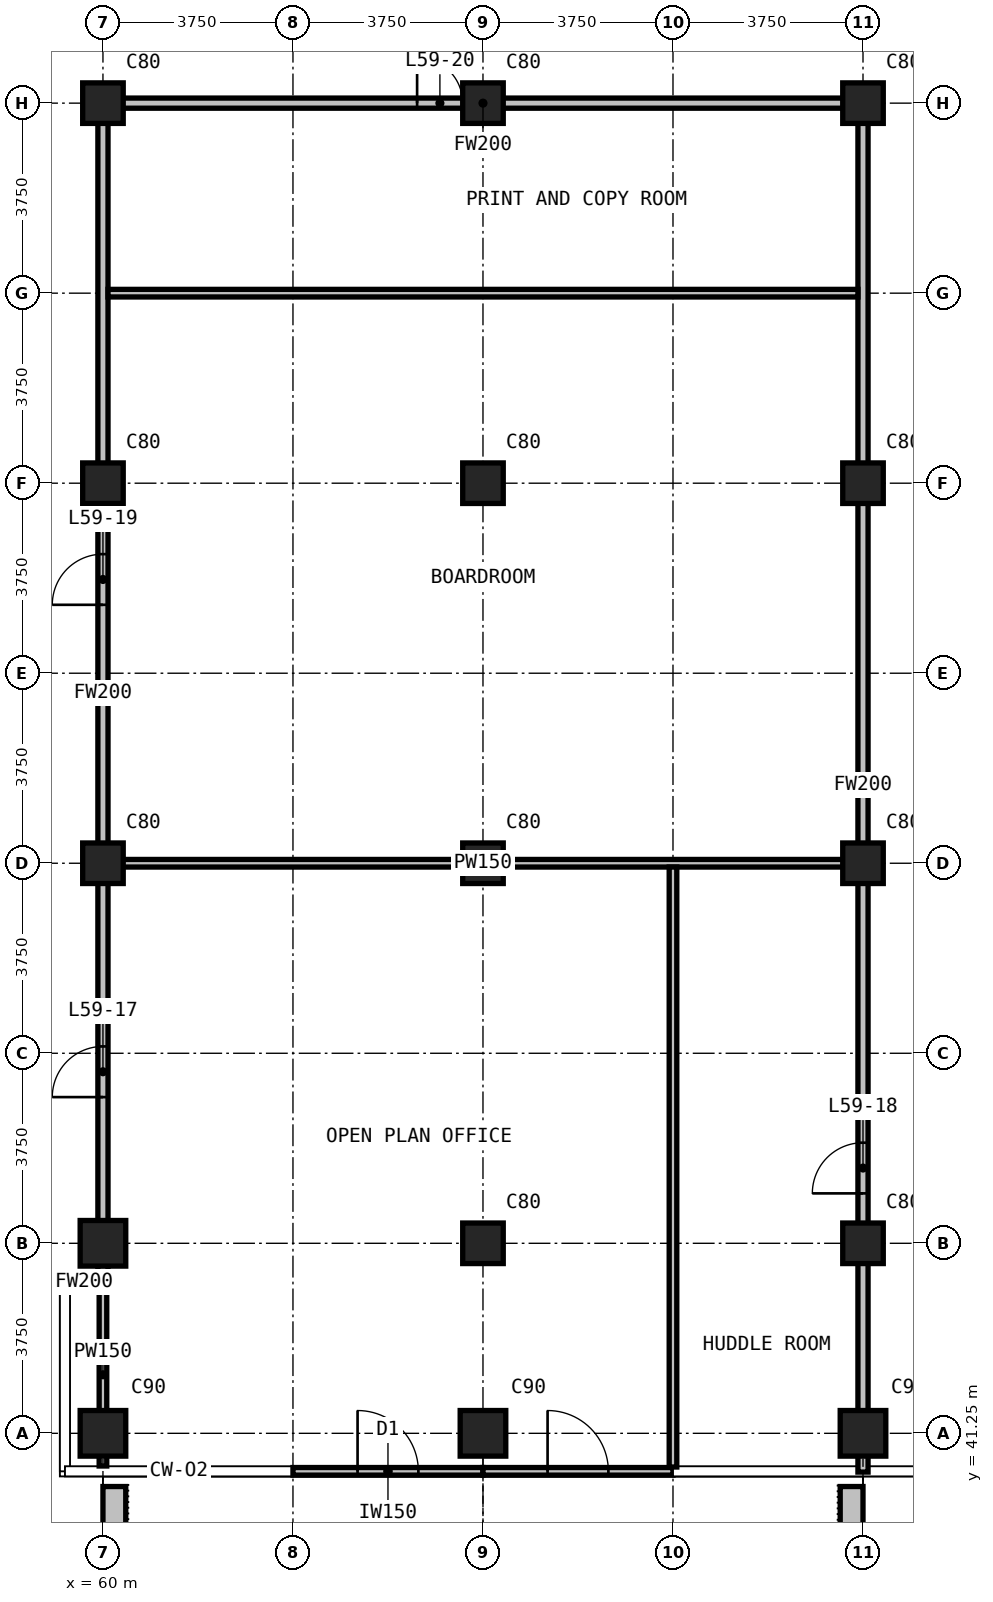
"""IFC4 building model, lengths in metres.
Left out: names, types, materials, properties, quantities, classifications, styles, units other than length and angle.
Written with IfcOpenShell. Run it as: python <this file> out.ifc"""

import sys

from ifc_helpers import new_model, si_unit, direction, frame, frame_2d, origin, origin_2d, place, context, subcontext, project, spatial, rectangle, extrude, element, fill, save


model = new_model("IFC4")
c1 = context("Model", 3, precision=1e-05, world=origin(), true_north=direction((0.0, 1.0)))
c2 = subcontext(c1, "Body", "Model", "MODEL_VIEW")
j1 = project(units=[si_unit("LENGTHUNIT", "METRE"), si_unit("PLANEANGLEUNIT", "RADIAN")], contexts=[c1])
p1 = place(None, origin())
s1 = spatial("IfcSite", under=j1, at=p1, CompositionType="ELEMENT")
p2 = place(p1, origin())
s2 = spatial("IfcBuilding", under=s1, at=p2, CompositionType="ELEMENT")
p3 = place(p2, frame((0.0, 0.0, 228.3)))
s3 = spatial("IfcBuildingStorey", under=s2, at=p3, CompositionType="ELEMENT", Elevation=228.3)
for number, where, z_axis, x_axis in (
    (1, (60.0, 41.25, 0.0), (0.0, 0.0, 1.0), (1.0, 0.0, 0.0)),
    (2, (60.0, 45.0, 0.0), (0.0, 0.0, 1.0), (1.0, 0.0, 0.0)),
):
    element("IfcColumn", number, at=place(p3, frame(where, z_axis=z_axis, x_axis=x_axis)), inside=s3, PredefinedType="COLUMN", context=c2, shape_type="SweptSolid", body=[
        extrude(rectangle(XDim=0.9, YDim=0.9, at=origin_2d()), origin(), (0.0, 0.0, 1.0), 3.6),
    ])
for number, where, z_axis, x_axis in (
    (3, (60.0, 52.5, 0.0), (0.0, 0.0, 1.0), (1.0, 0.0, 0.0)),
    (4, (60.0, 60.0, 0.0), (0.0, 0.0, 1.0), (1.0, 0.0, 0.0)),
    (5, (60.0, 67.5, 0.0), (0.0, 0.0, 1.0), (1.0, 0.0, 0.0)),
):
    element("IfcColumn", number, at=place(p3, frame(where, z_axis=z_axis, x_axis=x_axis)), inside=s3, PredefinedType="COLUMN", context=c2, shape_type="SweptSolid", body=[
        extrude(rectangle(XDim=0.8, YDim=0.8, at=origin_2d()), origin(), (0.0, 0.0, 1.0), 3.6),
    ])
p4 = place(p3, frame((67.5, 41.25, 0.0), z_axis=(0.0, 0.0, 1.0), x_axis=(1.0, 0.0, 0.0)))
e6 = element("IfcColumn", 6, at=p4, inside=s3, PredefinedType="COLUMN", context=c2, shape_type="SweptSolid", body=[
    extrude(rectangle(XDim=0.9, YDim=0.9, at=origin_2d()), origin(), (0.0, 0.0, 1.0), 3.6),
])
for number, where, z_axis, x_axis in (
    (7, (67.5, 45.0, 0.0), (0.0, 0.0, 1.0), (1.0, 0.0, 0.0)),
    (8, (67.5, 52.5, 0.0), (0.0, 0.0, 1.0), (1.0, 0.0, 0.0)),
    (9, (67.5, 60.0, 0.0), (0.0, 0.0, 1.0), (1.0, 0.0, 0.0)),
    (10, (67.5, 67.5, 0.0), (0.0, 0.0, 1.0), (1.0, 0.0, 0.0)),
):
    element("IfcColumn", number, at=place(p3, frame(where, z_axis=z_axis, x_axis=x_axis)), inside=s3, PredefinedType="COLUMN", context=c2, shape_type="SweptSolid", body=[
        extrude(rectangle(XDim=0.8, YDim=0.8, at=origin_2d()), origin(), (0.0, 0.0, 1.0), 3.6),
    ])
p5 = place(p3, frame((75.0, 41.25, 0.0), z_axis=(0.0, 0.0, 1.0), x_axis=(1.0, 0.0, 0.0)))
e11 = element("IfcColumn", 11, at=p5, inside=s3, PredefinedType="COLUMN", context=c2, shape_type="SweptSolid", body=[
    extrude(rectangle(XDim=0.9, YDim=0.9, at=origin_2d()), origin(), (0.0, 0.0, 1.0), 3.6),
])
for number, where, z_axis, x_axis in (
    (12, (75.0, 45.0, 0.0), (0.0, 0.0, 1.0), (1.0, 0.0, 0.0)),
    (13, (75.0, 52.5, 0.0), (0.0, 0.0, 1.0), (1.0, 0.0, 0.0)),
    (14, (75.0, 60.0, 0.0), (0.0, 0.0, 1.0), (1.0, 0.0, 0.0)),
    (15, (75.0, 67.5, 0.0), (0.0, 0.0, 1.0), (1.0, 0.0, 0.0)),
):
    element("IfcColumn", number, at=place(p3, frame(where, z_axis=z_axis, x_axis=x_axis)), inside=s3, PredefinedType="COLUMN", context=c2, shape_type="SweptSolid", body=[
        extrude(rectangle(XDim=0.8, YDim=0.8, at=origin_2d()), origin(), (0.0, 0.0, 1.0), 3.6),
    ])
p6 = place(p3, frame((63.75, 40.5, 0.0), z_axis=(0.0, 0.0, 1.0), x_axis=(1.0, 0.0, 0.0)))
e16 = element("IfcWall", 16, at=p6, inside=s3, PredefinedType="SOLIDWALL", context=c2, shape_type="SweptSolid", body=[
    extrude(rectangle(XDim=3.75, YDim=0.15, at=frame_2d((1.875, 0.0))), origin(), (0.0, 0.0, 1.0), 3.3),
])
p7 = place(p6, frame((1.275, 0.0, 0.0)))
e17 = element("IfcOpeningElement", 17, at=p7, cuts=e16, PredefinedType="OPENING", context=c2, shape_type="SweptSolid", body=[
    extrude(rectangle(XDim=1.2, YDim=2.4, at=frame_2d((0.6, 1.2))), frame((0.0, 0.085, 0.0), z_axis=(0.0, -1.0, 0.0), x_axis=(1.0, 0.0, 0.0)), (0.0, 0.0, 1.0), 0.17),
])
p8 = place(p3, frame((67.5, 40.5, 0.0), z_axis=(0.0, 0.0, 1.0), x_axis=(1.0, 0.0, 0.0)))
e18 = element("IfcWall", 18, at=p8, inside=s3, PredefinedType="SOLIDWALL", context=c2, shape_type="SweptSolid", body=[
    extrude(rectangle(XDim=3.75, YDim=0.15, at=frame_2d((1.875, 0.0))), origin(), (0.0, 0.0, 1.0), 3.3),
])
p9 = place(p8, frame((1.275, 0.0, 0.0)))
e19 = element("IfcOpeningElement", 19, at=p9, cuts=e18, PredefinedType="OPENING", context=c2, shape_type="SweptSolid", body=[
    extrude(rectangle(XDim=1.2, YDim=2.4, at=frame_2d((0.6, 1.2))), frame((0.0, 0.085, 0.0), z_axis=(0.0, -1.0, 0.0), x_axis=(1.0, 0.0, 0.0)), (0.0, 0.0, 1.0), 0.17),
])
for number, where, z_axis, x_axis in (
    (20, (60.225, 40.2, 0.0), (0.0, 0.0, 1.0), (0.0, -1.0, 0.0)),
    (21, (74.775, 40.2, 0.0), (0.0, 0.0, 1.0), (0.0, -1.0, 0.0)),
):
    element("IfcWall", number, at=place(p3, frame(where, z_axis=z_axis, x_axis=x_axis)), inside=s3, PredefinedType="USERDEFINED", context=c2, shape_type="SweptSolid", body=[
        extrude(rectangle(XDim=2.35, YDim=0.45, at=frame_2d((1.175, 0.0))), origin(), (0.0, 0.0, 1.0), 1.1),
    ])
p10 = place(p3, frame((59.355, 44.235, 0.0), z_axis=(0.0, 0.0, 1.0), x_axis=(1.0, 0.0, 0.0)))
e22 = element("IfcWall", 22, at=p10, inside=s3, PredefinedType="PARTITIONING", context=c2, shape_type="SweptSolid", body=[
    extrude(rectangle(XDim=0.545, YDim=0.2, at=frame_2d((0.272, 0.0))), origin(), (0.0, 0.0, 1.0), 3.3),
])
p11 = place(p3, frame((60.1, 67.5, 0.0), z_axis=(0.0, 0.0, 1.0), x_axis=(1.0, 0.0, 0.0)))
e23 = element("IfcWall", 23, at=p11, inside=s3, PredefinedType="PARTITIONING", context=c2, shape_type="SweptSolid", body=[
    extrude(rectangle(XDim=14.8, YDim=0.2, at=frame_2d((7.4, 0.0))), origin(), (0.0, 0.0, 1.0), 3.3),
])
p12 = place(p11, frame((6.1, 0.0, 0.0)))
e24 = element("IfcOpeningElement", 24, at=p12, cuts=e23, PredefinedType="OPENING", context=c2, shape_type="SweptSolid", body=[
    extrude(rectangle(XDim=0.9, YDim=2.2, at=frame_2d((0.45, 1.1))), frame((0.0, 0.11, 0.0), z_axis=(0.0, -1.0, 0.0), x_axis=(1.0, 0.0, 0.0)), (0.0, 0.0, 1.0), 0.22),
])
p13 = place(p3, frame((60.0, 44.135, 0.0), z_axis=(0.0, 0.0, 1.0), x_axis=(0.0, 1.0, 0.0)))
e25 = element("IfcWall", 25, at=p13, inside=s3, PredefinedType="PARTITIONING", context=c2, shape_type="SweptSolid", body=[
    extrude(rectangle(XDim=23.465, YDim=0.2, at=frame_2d((11.732, 0.0))), origin(), (0.0, 0.0, 1.0), 3.3),
])
p14 = place(p13, frame((3.75, 0.0, 0.0)))
e26 = element("IfcOpeningElement", 26, at=p14, cuts=e25, PredefinedType="OPENING", context=c2, shape_type="SweptSolid", body=[
    extrude(rectangle(XDim=1.0, YDim=2.2, at=frame_2d((0.5, 1.1))), frame((0.0, 0.11, 0.0), z_axis=(0.0, -1.0, 0.0), x_axis=(1.0, 0.0, 0.0)), (0.0, 0.0, 1.0), 0.22),
])
p15 = place(p13, frame((13.465, 0.0, 0.0)))
e27 = element("IfcOpeningElement", 27, at=p15, cuts=e25, PredefinedType="OPENING", context=c2, shape_type="SweptSolid", body=[
    extrude(rectangle(XDim=1.0, YDim=2.2, at=frame_2d((0.5, 1.1))), frame((0.0, 0.11, 0.0), z_axis=(0.0, -1.0, 0.0), x_axis=(1.0, 0.0, 0.0)), (0.0, 0.0, 1.0), 0.22),
])
p16 = place(p3, frame((75.0, 40.485, 0.0), z_axis=(0.0, 0.0, 1.0), x_axis=(0.0, 1.0, 0.0)))
e28 = element("IfcWall", 28, at=p16, inside=s3, PredefinedType="PARTITIONING", context=c2, shape_type="SweptSolid", body=[
    extrude(rectangle(XDim=27.115, YDim=0.2, at=frame_2d((13.558, 0.0))), origin(), (0.0, 0.0, 1.0), 3.3),
])
p17 = place(p16, frame((5.5, 0.0, 0.0)))
e29 = element("IfcOpeningElement", 29, at=p17, cuts=e28, PredefinedType="OPENING", context=c2, shape_type="SweptSolid", body=[
    extrude(rectangle(XDim=1.0, YDim=2.2, at=frame_2d((0.5, 1.1))), frame((0.0, 0.11, 0.0), z_axis=(0.0, -1.0, 0.0), x_axis=(1.0, 0.0, 0.0)), (0.0, 0.0, 1.0), 0.22),
])
for number, where, z_axis, x_axis in (
    (30, (60.1, 52.5, 0.0), (0.0, 0.0, 1.0), (1.0, 0.0, 0.0)),
    (31, (60.1, 63.75, 0.0), (0.0, 0.0, 1.0), (1.0, 0.0, 0.0)),
):
    element("IfcWall", number, at=place(p3, frame(where, z_axis=z_axis, x_axis=x_axis)), inside=s3, PredefinedType="PARTITIONING", context=c2, shape_type="SweptSolid", body=[
        extrude(rectangle(XDim=14.8, YDim=0.15, at=frame_2d((7.4, 0.0))), origin(), (0.0, 0.0, 1.0), 3.3),
    ])
p18 = place(p3, frame((60.0, 40.605, 0.0), z_axis=(0.0, 0.0, 1.0), x_axis=(0.0, 1.0, 0.0)))
e32 = element("IfcWall", 32, at=p18, inside=s3, PredefinedType="PARTITIONING", context=c2, shape_type="SweptSolid", body=[
    extrude(rectangle(XDim=3.6, YDim=0.15, at=frame_2d((1.8, 0.0))), origin(), (0.0, 0.0, 1.0), 3.3),
])
p19 = place(p3, frame((71.25, 40.585, 0.0), z_axis=(0.0, 0.0, 1.0), x_axis=(0.0, 1.0, 0.0)))
e33 = element("IfcWall", 33, at=p19, inside=s3, PredefinedType="PARTITIONING", context=c2, shape_type="SweptSolid", body=[
    extrude(rectangle(XDim=11.84, YDim=0.15, at=frame_2d((5.92, 0.0))), origin(), (0.0, 0.0, 1.0), 3.3),
])
p20 = place(p7, origin())
e34 = element("IfcDoor", 34, at=p20, inside=s3, OperationType="SINGLE_SWING_LEFT", PredefinedType="DOOR", context=c2, shape_type="SweptSolid", body=[
    extrude(rectangle(XDim=1.2, YDim=2.4, at=frame_2d((0.6, 1.2))), frame((0.0, 0.025, 0.0), z_axis=(0.0, -1.0, 0.0), x_axis=(1.0, 0.0, 0.0)), (0.0, 0.0, 1.0), 0.05),
])
fill(e17, e34)
p21 = place(p9, origin())
e35 = element("IfcDoor", 35, at=p21, inside=s3, OperationType="SINGLE_SWING_LEFT", PredefinedType="DOOR", context=c2, shape_type="SweptSolid", body=[
    extrude(rectangle(XDim=1.2, YDim=2.4, at=frame_2d((0.6, 1.2))), frame((0.0, 0.025, 0.0), z_axis=(0.0, -1.0, 0.0), x_axis=(1.0, 0.0, 0.0)), (0.0, 0.0, 1.0), 0.05),
])
fill(e19, e35)
p22 = place(p14, origin())
e36 = element("IfcDoor", 36, at=p22, inside=s3, OperationType="SINGLE_SWING_LEFT", PredefinedType="DOOR", context=c2, shape_type="SweptSolid", body=[
    extrude(rectangle(XDim=1.0, YDim=2.2, at=frame_2d((0.5, 1.1))), frame((0.0, 0.025, 0.0), z_axis=(0.0, -1.0, 0.0), x_axis=(1.0, 0.0, 0.0)), (0.0, 0.0, 1.0), 0.05),
])
fill(e26, e36)
p23 = place(p17, origin())
e37 = element("IfcDoor", 37, at=p23, inside=s3, OperationType="SINGLE_SWING_RIGHT", PredefinedType="DOOR", context=c2, shape_type="SweptSolid", body=[
    extrude(rectangle(XDim=1.0, YDim=2.2, at=frame_2d((0.5, 1.1))), frame((0.0, 0.025, 0.0), z_axis=(0.0, -1.0, 0.0), x_axis=(1.0, 0.0, 0.0)), (0.0, 0.0, 1.0), 0.05),
])
fill(e29, e37)
p24 = place(p15, origin())
e38 = element("IfcDoor", 38, at=p24, inside=s3, OperationType="SINGLE_SWING_LEFT", PredefinedType="DOOR", context=c2, shape_type="SweptSolid", body=[
    extrude(rectangle(XDim=1.0, YDim=2.2, at=frame_2d((0.5, 1.1))), frame((0.0, 0.025, 0.0), z_axis=(0.0, -1.0, 0.0), x_axis=(1.0, 0.0, 0.0)), (0.0, 0.0, 1.0), 0.05),
])
fill(e27, e38)
p25 = place(p12, origin())
e39 = element("IfcDoor", 39, at=p25, inside=s3, OperationType="SINGLE_SWING_LEFT", PredefinedType="DOOR", context=c2, shape_type="SweptSolid", body=[
    extrude(rectangle(XDim=0.9, YDim=2.2, at=frame_2d((0.45, 1.1))), frame((0.0, 0.025, 0.0), z_axis=(0.0, -1.0, 0.0), x_axis=(1.0, 0.0, 0.0)), (0.0, 0.0, 1.0), 0.05),
])
fill(e24, e39)
save(model, sys.argv[1])
